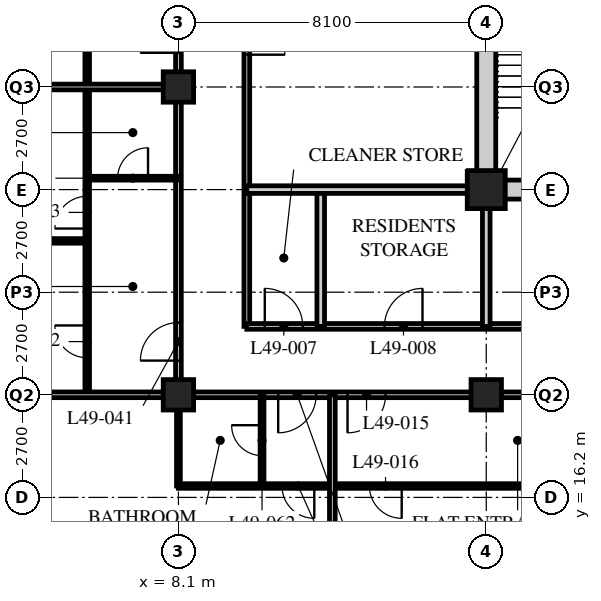
"""IFC4 building model, lengths in metres.
Left out: names, types, materials, properties, quantities, classifications, styles, units other than length and angle.
Written with IfcOpenShell. Run it as: python <this file> out.ifc"""

import sys

from ifc_helpers import new_model, si_unit, direction, frame, frame_2d, origin, origin_2d, place, context, subcontext, project, spatial, rectangle, hollow_rectangle, extrude, element, fill, save


model = new_model("IFC4")
c1 = context("Model", 3, precision=1e-05, world=origin(), true_north=direction((0.0, 1.0)))
c2 = subcontext(c1, "Body", "Model", "MODEL_VIEW")
j1 = project(units=[si_unit("LENGTHUNIT", "METRE"), si_unit("PLANEANGLEUNIT", "RADIAN")], contexts=[c1])
p1 = place(None, origin())
s1 = spatial("IfcSite", under=j1, at=p1, CompositionType="ELEMENT")
p2 = place(p1, origin())
s2 = spatial("IfcBuilding", under=s1, at=p2, CompositionType="ELEMENT")
p3 = place(p2, frame((0.0, 0.0, 192.0)))
s3 = spatial("IfcBuildingStorey", under=s2, at=p3, CompositionType="ELEMENT", Elevation=192.0)
for number, where, z_axis, x_axis in (
    (1, (8.1, 18.9, 0.0), (0.0, 0.0, 1.0), (1.0, 0.0, 0.0)),
    (2, (8.1, 27.0, 0.0), (0.0, 0.0, 1.0), (1.0, 0.0, 0.0)),
    (3, (16.2, 18.9, 0.0), (0.0, 0.0, 1.0), (1.0, 0.0, 0.0)),
):
    element("IfcColumn", number, at=place(p3, frame(where, z_axis=z_axis, x_axis=x_axis)), inside=s3, PredefinedType="COLUMN", context=c2, shape_type="SweptSolid", body=[
        extrude(hollow_rectangle(XDim=0.8, YDim=0.8, WallThickness=0.08, at=origin_2d()), origin(), (0.0, 0.0, 1.0), 3.6),
    ])
p4 = place(p3, frame((16.2, 24.3, 0.0), z_axis=(0.0, 0.0, 1.0), x_axis=(1.0, 0.0, 0.0)))
e4 = element("IfcColumn", 4, at=p4, inside=s3, PredefinedType="COLUMN", context=c2, shape_type="SweptSolid", body=[
    extrude(hollow_rectangle(XDim=1.0, YDim=1.0, WallThickness=0.1, at=origin_2d()), origin(), (0.0, 0.0, 1.0), 3.6),
])
p5 = place(p3, frame((8.1, 18.9, 0.0), z_axis=(0.0, 0.0, 1.0), x_axis=(1.0, 0.0, 0.0)))
e5 = element("IfcWall", 5, at=p5, inside=s3, PredefinedType="PARTITIONING", context=c2, shape_type="SweptSolid", body=[
    extrude(rectangle(XDim=40.5, YDim=0.15, at=frame_2d((20.25, 0.0))), origin(), (0.0, 0.0, 1.0), 2.778),
])
p6 = place(p5, frame((4.45, 0.0, 0.0)))
e6 = element("IfcOpeningElement", 6, at=p6, cuts=e5, PredefinedType="OPENING", context=c2, shape_type="SweptSolid", body=[
    extrude(rectangle(XDim=1.0, YDim=2.1, at=frame_2d((0.5, 1.05))), frame((0.0, 0.085, 0.0), z_axis=(0.0, -1.0, 0.0), x_axis=(1.0, 0.0, 0.0)), (0.0, 0.0, 1.0), 0.17),
])
p7 = place(p5, frame((17.1, 0.0, 0.0)))
e7 = element("IfcOpeningElement", 7, at=p7, cuts=e5, PredefinedType="OPENING", context=c2, shape_type="SweptSolid", body=[
    extrude(rectangle(XDim=1.0, YDim=2.1, at=frame_2d((0.5, 1.05))), frame((0.0, 0.085, 0.0), z_axis=(0.0, -1.0, 0.0), x_axis=(1.0, 0.0, 0.0)), (0.0, 0.0, 1.0), 0.17),
])
p8 = place(p5, frame((28.75, 0.0, 0.0)))
e8 = element("IfcOpeningElement", 8, at=p8, cuts=e5, PredefinedType="OPENING", context=c2, shape_type="SweptSolid", body=[
    extrude(rectangle(XDim=1.0, YDim=2.1, at=frame_2d((0.5, 1.05))), frame((0.0, 0.085, 0.0), z_axis=(0.0, -1.0, 0.0), x_axis=(1.0, 0.0, 0.0)), (0.0, 0.0, 1.0), 0.17),
])
p9 = place(p5, frame((2.625, 0.0, 0.0)))
e9 = element("IfcOpeningElement", 9, at=p9, cuts=e5, PredefinedType="OPENING", context=c2, shape_type="SweptSolid", body=[
    extrude(rectangle(XDim=1.0, YDim=2.1, at=frame_2d((0.5, 1.05))), frame((0.0, 0.085, 0.0), z_axis=(0.0, -1.0, 0.0), x_axis=(1.0, 0.0, 0.0)), (0.0, 0.0, 1.0), 0.17),
])
p10 = place(p5, frame((36.875, 0.0, 0.0)))
e10 = element("IfcOpeningElement", 10, at=p10, cuts=e5, PredefinedType="OPENING", context=c2, shape_type="SweptSolid", body=[
    extrude(rectangle(XDim=1.0, YDim=2.1, at=frame_2d((0.5, 1.05))), frame((0.0, 0.085, 0.0), z_axis=(0.0, -1.0, 0.0), x_axis=(1.0, 0.0, 0.0)), (0.0, 0.0, 1.0), 0.17),
])
p11 = place(p3, frame((8.1, 18.9, 0.0), z_axis=(0.0, 0.0, 1.0), x_axis=(0.0, 1.0, 0.0)))
e11 = element("IfcWall", 11, at=p11, inside=s3, PredefinedType="PARTITIONING", context=c2, shape_type="SweptSolid", body=[
    extrude(rectangle(XDim=24.3, YDim=0.15, at=frame_2d((12.15, 0.0))), origin(), (0.0, 0.0, 1.0), 2.778),
])
p12 = place(p11, frame((0.9, 0.0, 0.0)))
e12 = element("IfcOpeningElement", 12, at=p12, cuts=e11, PredefinedType="OPENING", context=c2, shape_type="SweptSolid", body=[
    extrude(rectangle(XDim=1.0, YDim=2.1, at=frame_2d((0.5, 1.05))), frame((0.0, 0.085, 0.0), z_axis=(0.0, -1.0, 0.0), x_axis=(1.0, 0.0, 0.0)), (0.0, 0.0, 1.0), 0.17),
])
p13 = place(p11, frame((9.0, 0.0, 0.0)))
e13 = element("IfcOpeningElement", 13, at=p13, cuts=e11, PredefinedType="OPENING", context=c2, shape_type="SweptSolid", body=[
    extrude(rectangle(XDim=1.0, YDim=2.1, at=frame_2d((0.5, 1.05))), frame((0.0, 0.085, 0.0), z_axis=(0.0, -1.0, 0.0), x_axis=(1.0, 0.0, 0.0)), (0.0, 0.0, 1.0), 0.17),
])
p14 = place(p11, frame((17.1, 0.0, 0.0)))
e14 = element("IfcOpeningElement", 14, at=p14, cuts=e11, PredefinedType="OPENING", context=c2, shape_type="SweptSolid", body=[
    extrude(rectangle(XDim=1.0, YDim=2.1, at=frame_2d((0.5, 1.05))), frame((0.0, 0.085, 0.0), z_axis=(0.0, -1.0, 0.0), x_axis=(1.0, 0.0, 0.0)), (0.0, 0.0, 1.0), 0.17),
])
p15 = place(p3, frame((9.9, 40.5, 0.0), z_axis=(0.0, 0.0, 1.0), x_axis=(0.0, -1.0, 0.0)))
e15 = element("IfcWall", 15, at=p15, inside=s3, PredefinedType="PARTITIONING", context=c2, shape_type="SweptSolid", body=[
    extrude(rectangle(XDim=19.8, YDim=0.15, at=frame_2d((9.9, 0.0))), origin(), (0.0, 0.0, 1.0), 3.39),
])
p16 = place(p15, frame((11.65, 0.0, 0.0)))
e16 = element("IfcOpeningElement", 16, at=p16, cuts=e15, PredefinedType="OPENING", context=c2, shape_type="SweptSolid", body=[
    extrude(rectangle(XDim=1.0, YDim=2.1, at=frame_2d((0.5, 1.05))), frame((0.0, 0.085, 0.0), z_axis=(0.0, -1.0, 0.0), x_axis=(1.0, 0.0, 0.0)), (0.0, 0.0, 1.0), 0.17),
])
p17 = place(p15, frame((3.55, 0.0, 0.0)))
e17 = element("IfcOpeningElement", 17, at=p17, cuts=e15, PredefinedType="OPENING", context=c2, shape_type="SweptSolid", body=[
    extrude(rectangle(XDim=1.0, YDim=2.1, at=frame_2d((0.5, 1.05))), frame((0.0, 0.085, 0.0), z_axis=(0.0, -1.0, 0.0), x_axis=(1.0, 0.0, 0.0)), (0.0, 0.0, 1.0), 0.17),
])
p18 = place(p3, frame((9.9, 20.7, 0.0), z_axis=(0.0, 0.0, 1.0), x_axis=(1.0, 0.0, 0.0)))
e18 = element("IfcWall", 18, at=p18, inside=s3, PredefinedType="PARTITIONING", context=c2, shape_type="SweptSolid", body=[
    extrude(rectangle(XDim=17.24, YDim=0.15, at=frame_2d((8.62, 0.0))), origin(), (0.0, 0.0, 1.0), 3.39),
])
p19 = place(p18, frame((0.472, 0.0, 0.0)))
e19 = element("IfcOpeningElement", 19, at=p19, cuts=e18, PredefinedType="OPENING", context=c2, shape_type="SweptSolid", body=[
    extrude(rectangle(XDim=1.0, YDim=2.1, at=frame_2d((0.5, 1.05))), frame((0.0, 0.085, 0.0), z_axis=(0.0, -1.0, 0.0), x_axis=(1.0, 0.0, 0.0)), (0.0, 0.0, 1.0), 0.17),
])
p20 = place(p18, frame((3.622, 0.0, 0.0)))
e20 = element("IfcOpeningElement", 20, at=p20, cuts=e18, PredefinedType="OPENING", context=c2, shape_type="SweptSolid", body=[
    extrude(rectangle(XDim=1.0, YDim=2.1, at=frame_2d((0.5, 1.05))), frame((0.0, 0.085, 0.0), z_axis=(0.0, -1.0, 0.0), x_axis=(1.0, 0.0, 0.0)), (0.0, 0.0, 1.0), 0.17),
])
p21 = place(p18, frame((9.828, 0.0, 0.0)))
e21 = element("IfcOpeningElement", 21, at=p21, cuts=e18, PredefinedType="OPENING", context=c2, shape_type="SweptSolid", body=[
    extrude(rectangle(XDim=1.0, YDim=2.1, at=frame_2d((0.5, 1.05))), frame((0.0, 0.085, 0.0), z_axis=(0.0, -1.0, 0.0), x_axis=(1.0, 0.0, 0.0)), (0.0, 0.0, 1.0), 0.17),
])
p22 = place(p18, frame((15.303, 0.0, 0.0)))
e22 = element("IfcOpeningElement", 22, at=p22, cuts=e18, PredefinedType="OPENING", context=c2, shape_type="SweptSolid", body=[
    extrude(rectangle(XDim=1.0, YDim=2.1, at=frame_2d((0.5, 1.05))), frame((0.0, 0.085, 0.0), z_axis=(0.0, -1.0, 0.0), x_axis=(1.0, 0.0, 0.0)), (0.0, 0.0, 1.0), 0.17),
])
p23 = place(p3, frame((16.2, 20.7, 0.0), z_axis=(0.0, 0.0, 1.0), x_axis=(0.0, 1.0, 0.0)))
e23 = element("IfcWall", 23, at=p23, inside=s3, PredefinedType="SOLIDWALL", context=c2, shape_type="SweptSolid", body=[
    extrude(rectangle(XDim=3.6, YDim=0.2, at=frame_2d((1.8, 0.0))), origin(), (0.0, 0.0, 1.0), 2.778),
])
p24 = place(p3, frame((11.844, 20.7, 0.0), z_axis=(0.0, 0.0, 1.0), x_axis=(0.0, 1.0, 0.0)))
e24 = element("IfcWall", 24, at=p24, inside=s3, PredefinedType="SOLIDWALL", context=c2, shape_type="SweptSolid", body=[
    extrude(rectangle(XDim=3.6, YDim=0.2, at=frame_2d((1.8, 0.0))), origin(), (0.0, 0.0, 1.0), 3.39),
])
p25 = place(p3, frame((9.9, 24.3, 0.0), z_axis=(0.0, 0.0, 1.0), x_axis=(1.0, 0.0, 0.0)))
e25 = element("IfcWall", 25, at=p25, inside=s3, PredefinedType="SOLIDWALL", context=c2, shape_type="SweptSolid", body=[
    extrude(rectangle(XDim=6.3, YDim=0.2, at=frame_2d((3.15, 0.0))), origin(), (0.0, 0.0, 1.0), 3.39),
])
p26 = place(p3, frame((5.7, 18.9, 0.0), z_axis=(0.0, 0.0, 1.0), x_axis=(0.0, 1.0, 0.0)))
e26 = element("IfcWall", 26, at=p26, inside=s3, PredefinedType="PARTITIONING", context=c2, shape_type="SweptSolid", body=[
    extrude(rectangle(XDim=24.3, YDim=0.12, at=frame_2d((12.15, 0.0))), origin(), (0.0, 0.0, 1.0), 3.39),
])
p27 = place(p26, frame((0.975, 0.0, 0.0)))
e27 = element("IfcOpeningElement", 27, at=p27, cuts=e26, PredefinedType="OPENING", context=c2, shape_type="SweptSolid", body=[
    extrude(rectangle(XDim=0.85, YDim=2.1, at=frame_2d((0.425, 1.05))), frame((0.0, 0.07, 0.0), z_axis=(0.0, -1.0, 0.0), x_axis=(1.0, 0.0, 0.0)), (0.0, 0.0, 1.0), 0.14),
])
p28 = place(p26, frame((4.375, 0.0, 0.0)))
e28 = element("IfcOpeningElement", 28, at=p28, cuts=e26, PredefinedType="OPENING", context=c2, shape_type="SweptSolid", body=[
    extrude(rectangle(XDim=0.85, YDim=2.1, at=frame_2d((0.425, 1.05))), frame((0.0, 0.07, 0.0), z_axis=(0.0, -1.0, 0.0), x_axis=(1.0, 0.0, 0.0)), (0.0, 0.0, 1.0), 0.14),
])
p29 = place(p26, frame((9.075, 0.0, 0.0)))
e29 = element("IfcOpeningElement", 29, at=p29, cuts=e26, PredefinedType="OPENING", context=c2, shape_type="SweptSolid", body=[
    extrude(rectangle(XDim=0.85, YDim=2.1, at=frame_2d((0.425, 1.05))), frame((0.0, 0.07, 0.0), z_axis=(0.0, -1.0, 0.0), x_axis=(1.0, 0.0, 0.0)), (0.0, 0.0, 1.0), 0.14),
])
p30 = place(p26, frame((12.475, 0.0, 0.0)))
e30 = element("IfcOpeningElement", 30, at=p30, cuts=e26, PredefinedType="OPENING", context=c2, shape_type="SweptSolid", body=[
    extrude(rectangle(XDim=0.85, YDim=2.1, at=frame_2d((0.425, 1.05))), frame((0.0, 0.07, 0.0), z_axis=(0.0, -1.0, 0.0), x_axis=(1.0, 0.0, 0.0)), (0.0, 0.0, 1.0), 0.14),
])
p31 = place(p26, frame((17.175, 0.0, 0.0)))
e31 = element("IfcOpeningElement", 31, at=p31, cuts=e26, PredefinedType="OPENING", context=c2, shape_type="SweptSolid", body=[
    extrude(rectangle(XDim=0.85, YDim=2.1, at=frame_2d((0.425, 1.05))), frame((0.0, 0.07, 0.0), z_axis=(0.0, -1.0, 0.0), x_axis=(1.0, 0.0, 0.0)), (0.0, 0.0, 1.0), 0.14),
])
p32 = place(p26, frame((20.575, 0.0, 0.0)))
e32 = element("IfcOpeningElement", 32, at=p32, cuts=e26, PredefinedType="OPENING", context=c2, shape_type="SweptSolid", body=[
    extrude(rectangle(XDim=0.85, YDim=2.1, at=frame_2d((0.425, 1.05))), frame((0.0, 0.07, 0.0), z_axis=(0.0, -1.0, 0.0), x_axis=(1.0, 0.0, 0.0)), (0.0, 0.0, 1.0), 0.14),
])
p33 = place(p3, frame((8.1, 24.6, 0.0), z_axis=(0.0, 0.0, 1.0), x_axis=(-1.0, 0.0, 0.0)))
e33 = element("IfcWall", 33, at=p33, inside=s3, PredefinedType="PARTITIONING", context=c2, shape_type="SweptSolid", body=[
    extrude(rectangle(XDim=2.4, YDim=0.1, at=frame_2d((1.2, 0.0))), origin(), (0.0, 0.0, 1.0), 3.39),
])
p34 = place(p33, frame((0.8, 0.0, 0.0)))
e34 = element("IfcOpeningElement", 34, at=p34, cuts=e33, PredefinedType="OPENING", context=c2, shape_type="SweptSolid", body=[
    extrude(rectangle(XDim=0.8, YDim=2.1, at=frame_2d((0.4, 1.05))), frame((0.0, 0.06, 0.0), z_axis=(0.0, -1.0, 0.0), x_axis=(1.0, 0.0, 0.0)), (0.0, 0.0, 1.0), 0.12),
])
p35 = place(p3, frame((5.7, 22.95, 0.0), z_axis=(0.0, 0.0, 1.0), x_axis=(-1.0, 0.0, 0.0)))
e35 = element("IfcWall", 35, at=p35, inside=s3, PredefinedType="PARTITIONING", context=c2, shape_type="SweptSolid", body=[
    extrude(rectangle(XDim=5.4, YDim=0.12, at=frame_2d((2.7, 0.0))), origin(), (0.0, 0.0, 1.0), 3.39),
])
p36 = place(p3, frame((8.1, 27.0, 0.0), z_axis=(0.0, 0.0, 1.0), x_axis=(-1.0, 0.0, 0.0)))
e36 = element("IfcWall", 36, at=p36, inside=s3, PredefinedType="PARTITIONING", context=c2, shape_type="SweptSolid", body=[
    extrude(rectangle(XDim=7.8, YDim=0.15, at=frame_2d((3.9, 0.0))), origin(), (0.0, 0.0, 1.0), 2.778),
])
p37 = place(p3, frame((8.1, 16.5, 0.0), z_axis=(0.0, 0.0, 1.0), x_axis=(1.0, 0.0, 0.0)))
e37 = element("IfcWall", 37, at=p37, inside=s3, PredefinedType="PARTITIONING", context=c2, shape_type="SweptSolid", body=[
    extrude(rectangle(XDim=40.5, YDim=0.12, at=frame_2d((20.25, 0.0))), origin(), (0.0, 0.0, 1.0), 3.39),
])
p38 = place(p37, frame((5.025, 0.0, 0.0)))
e38 = element("IfcOpeningElement", 38, at=p38, cuts=e37, PredefinedType="OPENING", context=c2, shape_type="SweptSolid", body=[
    extrude(rectangle(XDim=0.85, YDim=2.1, at=frame_2d((0.425, 1.05))), frame((0.0, 0.07, 0.0), z_axis=(0.0, -1.0, 0.0), x_axis=(1.0, 0.0, 0.0)), (0.0, 0.0, 1.0), 0.14),
])
p39 = place(p37, frame((12.475, 0.0, 0.0)))
e39 = element("IfcOpeningElement", 39, at=p39, cuts=e37, PredefinedType="OPENING", context=c2, shape_type="SweptSolid", body=[
    extrude(rectangle(XDim=0.85, YDim=2.1, at=frame_2d((0.425, 1.05))), frame((0.0, 0.07, 0.0), z_axis=(0.0, -1.0, 0.0), x_axis=(1.0, 0.0, 0.0)), (0.0, 0.0, 1.0), 0.14),
])
p40 = place(p37, frame((17.175, 0.0, 0.0)))
e40 = element("IfcOpeningElement", 40, at=p40, cuts=e37, PredefinedType="OPENING", context=c2, shape_type="SweptSolid", body=[
    extrude(rectangle(XDim=0.85, YDim=2.1, at=frame_2d((0.425, 1.05))), frame((0.0, 0.07, 0.0), z_axis=(0.0, -1.0, 0.0), x_axis=(1.0, 0.0, 0.0)), (0.0, 0.0, 1.0), 0.14),
])
p41 = place(p37, frame((24.625, 0.0, 0.0)))
e41 = element("IfcOpeningElement", 41, at=p41, cuts=e37, PredefinedType="OPENING", context=c2, shape_type="SweptSolid", body=[
    extrude(rectangle(XDim=0.85, YDim=2.1, at=frame_2d((0.425, 1.05))), frame((0.0, 0.07, 0.0), z_axis=(0.0, -1.0, 0.0), x_axis=(1.0, 0.0, 0.0)), (0.0, 0.0, 1.0), 0.14),
])
p42 = place(p37, frame((29.325, 0.0, 0.0)))
e42 = element("IfcOpeningElement", 42, at=p42, cuts=e37, PredefinedType="OPENING", context=c2, shape_type="SweptSolid", body=[
    extrude(rectangle(XDim=0.85, YDim=2.1, at=frame_2d((0.425, 1.05))), frame((0.0, 0.07, 0.0), z_axis=(0.0, -1.0, 0.0), x_axis=(1.0, 0.0, 0.0)), (0.0, 0.0, 1.0), 0.14),
])
p43 = place(p37, frame((32.725, 0.0, 0.0)))
e43 = element("IfcOpeningElement", 43, at=p43, cuts=e37, PredefinedType="OPENING", context=c2, shape_type="SweptSolid", body=[
    extrude(rectangle(XDim=0.85, YDim=2.1, at=frame_2d((0.425, 1.05))), frame((0.0, 0.07, 0.0), z_axis=(0.0, -1.0, 0.0), x_axis=(1.0, 0.0, 0.0)), (0.0, 0.0, 1.0), 0.14),
])
p44 = place(p37, frame((2.725, 0.0, 0.0)))
e44 = element("IfcOpeningElement", 44, at=p44, cuts=e37, PredefinedType="OPENING", context=c2, shape_type="SweptSolid", body=[
    extrude(rectangle(XDim=0.85, YDim=2.1, at=frame_2d((0.425, 1.05))), frame((0.0, 0.07, 0.0), z_axis=(0.0, -1.0, 0.0), x_axis=(1.0, 0.0, 0.0)), (0.0, 0.0, 1.0), 0.14),
])
p45 = place(p37, frame((36.925, 0.0, 0.0)))
e45 = element("IfcOpeningElement", 45, at=p45, cuts=e37, PredefinedType="OPENING", context=c2, shape_type="SweptSolid", body=[
    extrude(rectangle(XDim=0.85, YDim=2.1, at=frame_2d((0.425, 1.05))), frame((0.0, 0.07, 0.0), z_axis=(0.0, -1.0, 0.0), x_axis=(1.0, 0.0, 0.0)), (0.0, 0.0, 1.0), 0.14),
])
p46 = place(p3, frame((10.3, 18.9, 0.0), z_axis=(0.0, 0.0, 1.0), x_axis=(0.0, -1.0, 0.0)))
e46 = element("IfcWall", 46, at=p46, inside=s3, PredefinedType="PARTITIONING", context=c2, shape_type="SweptSolid", body=[
    extrude(rectangle(XDim=2.4, YDim=0.1, at=frame_2d((1.2, 0.0))), origin(), (0.0, 0.0, 1.0), 3.39),
])
p47 = place(p46, frame((0.8, 0.0, 0.0)))
e47 = element("IfcOpeningElement", 47, at=p47, cuts=e46, PredefinedType="OPENING", context=c2, shape_type="SweptSolid", body=[
    extrude(rectangle(XDim=0.8, YDim=2.1, at=frame_2d((0.4, 1.05))), frame((0.0, 0.06, 0.0), z_axis=(0.0, -1.0, 0.0), x_axis=(1.0, 0.0, 0.0)), (0.0, 0.0, 1.0), 0.12),
])
p48 = place(p3, frame((8.1, 18.9, 0.0), z_axis=(0.0, 0.0, 1.0), x_axis=(0.0, -1.0, 0.0)))
e48 = element("IfcWall", 48, at=p48, inside=s3, PredefinedType="PARTITIONING", context=c2, shape_type="SweptSolid", body=[
    extrude(rectangle(XDim=2.4, YDim=0.1, at=frame_2d((1.2, 0.0))), origin(), (0.0, 0.0, 1.0), 2.778),
])
p49 = place(p3, frame((4.35, 18.9, 0.0), z_axis=(0.0, 0.0, 1.0), x_axis=(1.0, 0.0, 0.0)))
e49 = element("IfcWall", 49, at=p49, inside=s3, PredefinedType="PARTITIONING", context=c2, shape_type="SweptSolid", body=[
    extrude(rectangle(XDim=3.75, YDim=0.15, at=frame_2d((1.875, 0.0))), origin(), (0.0, 0.0, 1.0), 2.778),
])
p50 = place(p3, frame((12.15, 18.9, 0.0), z_axis=(0.0, 0.0, 1.0), x_axis=(0.0, -1.0, 0.0)))
e50 = element("IfcWall", 50, at=p50, inside=s3, PredefinedType="PARTITIONING", context=c2, shape_type="SweptSolid", body=[
    extrude(rectangle(XDim=7.8, YDim=0.15, at=frame_2d((3.9, 0.0))), origin(), (0.0, 0.0, 1.0), 3.39),
])
p51 = place(p3, frame((15.95, 24.3, 0.0), z_axis=(0.0, 0.0, 1.0), x_axis=(1.0, 0.0, 0.0)))
e51 = element("IfcWall", 51, at=p51, inside=s3, PredefinedType="SOLIDWALL", context=c2, shape_type="SweptSolid", body=[
    extrude(rectangle(XDim=24.8, YDim=0.5, at=frame_2d((12.4, 0.0))), origin(), (0.0, 0.0, 1.0), 2.74),
])
p52 = place(p51, frame((11.5, 0.0, 0.0)))
e52 = element("IfcOpeningElement", 52, at=p52, cuts=e51, PredefinedType="OPENING", context=c2, shape_type="SweptSolid", body=[
    extrude(rectangle(XDim=1.8, YDim=2.4, at=frame_2d((0.9, 1.2))), frame((0.0, 0.26, 0.0), z_axis=(0.0, -1.0, 0.0), x_axis=(1.0, 0.0, 0.0)), (0.0, 0.0, 1.0), 0.52),
])
p53 = place(p3, frame((16.2, 24.55, 0.0), z_axis=(0.0, 0.0, 1.0), x_axis=(0.0, 1.0, 0.0)))
e53 = element("IfcWall", 53, at=p53, inside=s3, PredefinedType="SOLIDWALL", context=c2, shape_type="SweptSolid", body=[
    extrude(rectangle(XDim=15.7, YDim=0.5, at=frame_2d((7.85, 0.0))), origin(), (0.0, 0.0, 1.0), 2.778),
])
p54 = place(p16, origin())
e54 = element("IfcDoor", 54, at=p54, inside=s3, OperationType="SINGLE_SWING_RIGHT", PredefinedType="DOOR", context=c2, shape_type="SweptSolid", body=[
    extrude(rectangle(XDim=1.0, YDim=2.1, at=frame_2d((0.5, 1.05))), frame((0.0, 0.025, 0.0), z_axis=(0.0, -1.0, 0.0), x_axis=(1.0, 0.0, 0.0)), (0.0, 0.0, 1.0), 0.05),
])
fill(e16, e54)
p55 = place(p19, origin())
e55 = element("IfcDoor", 55, at=p55, inside=s3, OperationType="SINGLE_SWING_LEFT", PredefinedType="DOOR", context=c2, shape_type="SweptSolid", body=[
    extrude(rectangle(XDim=1.0, YDim=2.1, at=frame_2d((0.5, 1.05))), frame((0.0, 0.025, 0.0), z_axis=(0.0, -1.0, 0.0), x_axis=(1.0, 0.0, 0.0)), (0.0, 0.0, 1.0), 0.05),
])
fill(e19, e55)
p56 = place(p20, origin())
e56 = element("IfcDoor", 56, at=p56, inside=s3, OperationType="SINGLE_SWING_RIGHT", PredefinedType="DOOR", context=c2, shape_type="SweptSolid", body=[
    extrude(rectangle(XDim=1.0, YDim=2.1, at=frame_2d((0.5, 1.05))), frame((0.0, 0.025, 0.0), z_axis=(0.0, -1.0, 0.0), x_axis=(1.0, 0.0, 0.0)), (0.0, 0.0, 1.0), 0.05),
])
fill(e20, e56)
p57 = place(p6, origin())
e57 = element("IfcDoor", 57, at=p57, inside=s3, OperationType="SINGLE_SWING_RIGHT", PredefinedType="DOOR", context=c2, shape_type="SweptSolid", body=[
    extrude(rectangle(XDim=1.0, YDim=2.1, at=frame_2d((0.5, 1.05))), frame((0.0, 0.025, 0.0), z_axis=(0.0, -1.0, 0.0), x_axis=(1.0, 0.0, 0.0)), (0.0, 0.0, 1.0), 0.05),
])
fill(e6, e57)
p58 = place(p38, origin())
e58 = element("IfcDoor", 58, at=p58, inside=s3, OperationType="SINGLE_SWING_LEFT", PredefinedType="DOOR", context=c2, shape_type="SweptSolid", body=[
    extrude(rectangle(XDim=0.85, YDim=2.1, at=frame_2d((0.425, 1.05))), frame((0.0, 0.025, 0.0), z_axis=(0.0, -1.0, 0.0), x_axis=(1.0, 0.0, 0.0)), (0.0, 0.0, 1.0), 0.05),
])
fill(e38, e58)
p59 = place(p34, origin())
e59 = element("IfcDoor", 59, at=p59, inside=s3, OperationType="SINGLE_SWING_RIGHT", PredefinedType="DOOR", context=c2, shape_type="SweptSolid", body=[
    extrude(rectangle(XDim=0.8, YDim=2.1, at=frame_2d((0.4, 1.05))), frame((0.0, 0.025, 0.0), z_axis=(0.0, -1.0, 0.0), x_axis=(1.0, 0.0, 0.0)), (0.0, 0.0, 1.0), 0.05),
])
fill(e34, e59)
p60 = place(p12, origin())
e60 = element("IfcDoor", 60, at=p60, inside=s3, OperationType="SINGLE_SWING_LEFT", PredefinedType="DOOR", context=c2, shape_type="SweptSolid", body=[
    extrude(rectangle(XDim=1.0, YDim=2.1, at=frame_2d((0.5, 1.05))), frame((0.0, 0.025, 0.0), z_axis=(0.0, -1.0, 0.0), x_axis=(1.0, 0.0, 0.0)), (0.0, 0.0, 1.0), 0.05),
])
fill(e12, e60)
p61 = place(p27, origin())
e61 = element("IfcDoor", 61, at=p61, inside=s3, OperationType="SINGLE_SWING_RIGHT", PredefinedType="DOOR", context=c2, shape_type="SweptSolid", body=[
    extrude(rectangle(XDim=0.85, YDim=2.1, at=frame_2d((0.425, 1.05))), frame((0.0, 0.025, 0.0), z_axis=(0.0, -1.0, 0.0), x_axis=(1.0, 0.0, 0.0)), (0.0, 0.0, 1.0), 0.05),
])
fill(e27, e61)
p62 = place(p28, origin())
e62 = element("IfcDoor", 62, at=p62, inside=s3, OperationType="SINGLE_SWING_LEFT", PredefinedType="DOOR", context=c2, shape_type="SweptSolid", body=[
    extrude(rectangle(XDim=0.85, YDim=2.1, at=frame_2d((0.425, 1.05))), frame((0.0, 0.025, 0.0), z_axis=(0.0, -1.0, 0.0), x_axis=(1.0, 0.0, 0.0)), (0.0, 0.0, 1.0), 0.05),
])
fill(e28, e62)
p63 = place(p13, origin())
e63 = element("IfcDoor", 63, at=p63, inside=s3, OperationType="SINGLE_SWING_LEFT", PredefinedType="DOOR", context=c2, shape_type="SweptSolid", body=[
    extrude(rectangle(XDim=1.0, YDim=2.1, at=frame_2d((0.5, 1.05))), frame((0.0, 0.025, 0.0), z_axis=(0.0, -1.0, 0.0), x_axis=(1.0, 0.0, 0.0)), (0.0, 0.0, 1.0), 0.05),
])
fill(e13, e63)
p64 = place(p47, origin())
e64 = element("IfcDoor", 64, at=p64, inside=s3, OperationType="SINGLE_SWING_RIGHT", PredefinedType="DOOR", context=c2, shape_type="SweptSolid", body=[
    extrude(rectangle(XDim=0.8, YDim=2.1, at=frame_2d((0.4, 1.05))), frame((0.0, 0.025, 0.0), z_axis=(0.0, -1.0, 0.0), x_axis=(1.0, 0.0, 0.0)), (0.0, 0.0, 1.0), 0.05),
])
fill(e47, e64)
p65 = place(p9, origin())
e65 = element("IfcDoor", 65, at=p65, inside=s3, OperationType="SINGLE_SWING_RIGHT", PredefinedType="DOOR", context=c2, shape_type="SweptSolid", body=[
    extrude(rectangle(XDim=1.0, YDim=2.1, at=frame_2d((0.5, 1.05))), frame((0.0, 0.025, 0.0), z_axis=(0.0, -1.0, 0.0), x_axis=(1.0, 0.0, 0.0)), (0.0, 0.0, 1.0), 0.05),
])
fill(e9, e65)
p66 = place(p44, origin())
e66 = element("IfcDoor", 66, at=p66, inside=s3, OperationType="SINGLE_SWING_LEFT", PredefinedType="DOOR", context=c2, shape_type="SweptSolid", body=[
    extrude(rectangle(XDim=0.85, YDim=2.1, at=frame_2d((0.425, 1.05))), frame((0.0, 0.025, 0.0), z_axis=(0.0, -1.0, 0.0), x_axis=(1.0, 0.0, 0.0)), (0.0, 0.0, 1.0), 0.05),
])
fill(e44, e66)
save(model, sys.argv[1])
